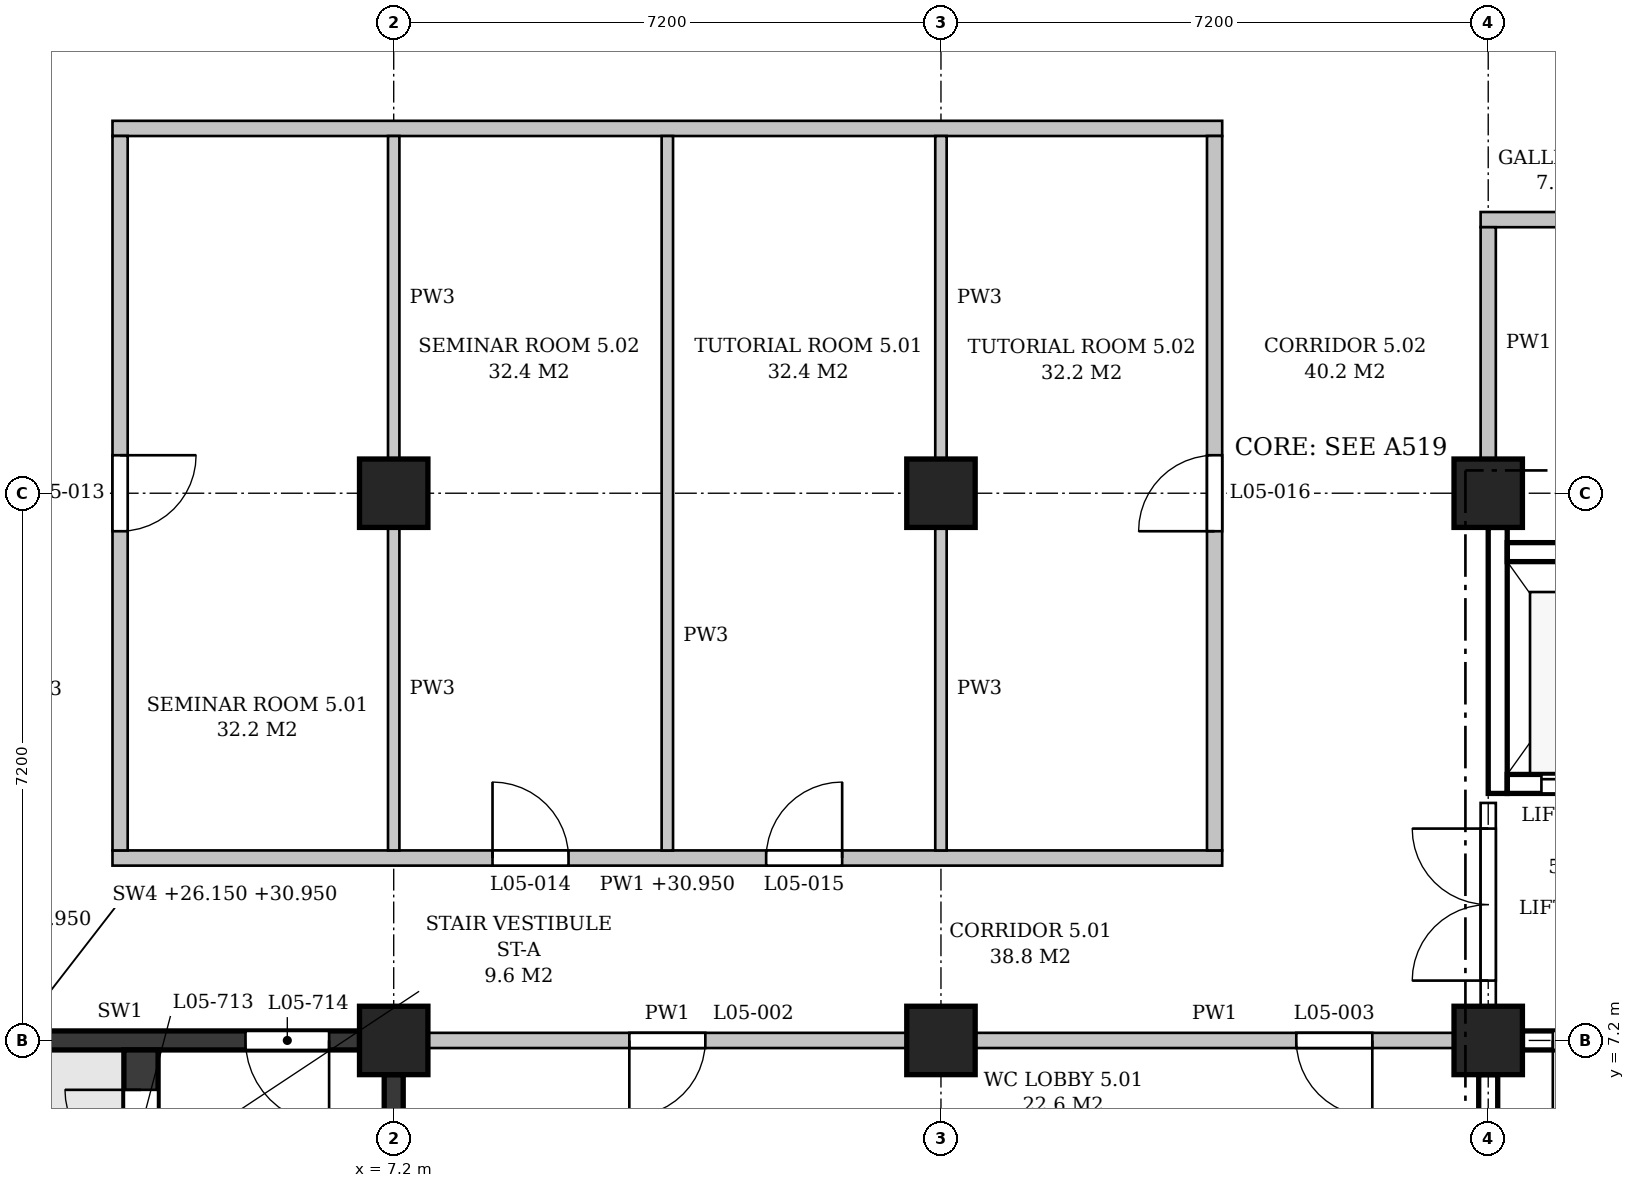
"""IFC4 building model, lengths in metres.
Left out: names, types, materials, properties, quantities, classifications, styles, units other than length and angle.
Written with IfcOpenShell. Run it as: python <this file> out.ifc"""

import sys

from ifc_helpers import new_model, si_unit, direction, frame, frame_2d, origin, origin_2d, place, context, subcontext, project, spatial, polyline, rectangle, outline, extrude, element, fill, save


model = new_model("IFC4")
c1 = context("Model", 3, precision=1e-05, world=origin(), true_north=direction((0.0, 1.0)))
c2 = subcontext(c1, "Body", "Model", "MODEL_VIEW")
j1 = project(units=[si_unit("LENGTHUNIT", "METRE"), si_unit("PLANEANGLEUNIT", "RADIAN")], contexts=[c1])
p1 = place(None, origin())
s1 = spatial("IfcSite", under=j1, at=p1, CompositionType="ELEMENT")
p2 = place(p1, origin())
s2 = spatial("IfcBuilding", under=s1, at=p2, CompositionType="ELEMENT")
p3 = place(p2, frame((0.0, 0.0, 26.4)))
s3 = spatial("IfcBuildingStorey", under=s2, at=p3, CompositionType="ELEMENT", Elevation=26.4)
for number, where, z_axis, x_axis in (
    (1, (7.2, 7.2, 0.0), (0.0, 0.0, 1.0), (1.0, 0.0, 0.0)),
    (2, (7.2, 14.4, 0.0), (0.0, 0.0, 1.0), (1.0, 0.0, 0.0)),
    (3, (14.4, 7.2, 0.0), (0.0, 0.0, 1.0), (1.0, 0.0, 0.0)),
    (4, (14.4, 14.4, 0.0), (0.0, 0.0, 1.0), (1.0, 0.0, 0.0)),
    (5, (21.6, 7.2, 0.0), (0.0, 0.0, 1.0), (1.0, 0.0, 0.0)),
    (6, (21.6, 14.4, 0.0), (0.0, 0.0, 1.0), (1.0, 0.0, 0.0)),
):
    element("IfcColumn", number, at=place(p3, frame(where, z_axis=z_axis, x_axis=x_axis)), inside=s3, PredefinedType="COLUMN", context=c2, shape_type="SweptSolid", body=[
        extrude(rectangle(XDim=0.9, YDim=0.9, at=origin_2d()), origin(), (0.0, 0.0, 1.0), 4.8),
    ])
p4 = place(p3, frame((0.45, 7.2, 0.0), z_axis=(0.0, 0.0, 1.0), x_axis=(1.0, 0.0, 0.0)))
e7 = element("IfcWall", 7, at=p4, inside=s3, PredefinedType="SHEAR", context=c2, shape_type="SweptSolid", body=[
    extrude(rectangle(XDim=6.3, YDim=0.25, at=frame_2d((3.15, 0.0))), origin(), (0.0, 0.0, 1.0), 3.8),
])
p5 = place(p4, frame((4.8, 0.0, 0.0)))
e8 = element("IfcOpeningElement", 8, at=p5, cuts=e7, PredefinedType="OPENING", context=c2, shape_type="SweptSolid", body=[
    extrude(rectangle(XDim=1.1, YDim=2.1, at=frame_2d((0.55, 1.05))), frame((0.0, 0.135, 0.0), z_axis=(0.0, -1.0, 0.0), x_axis=(1.0, 0.0, 0.0)), (0.0, 0.0, 1.0), 0.27),
])
p6 = place(p3, frame((7.2, 0.45, 0.0), z_axis=(0.0, 0.0, 1.0), x_axis=(0.0, 1.0, 0.0)))
e9 = element("IfcWall", 9, at=p6, inside=s3, PredefinedType="SHEAR", context=c2, shape_type="SweptSolid", body=[
    extrude(rectangle(XDim=6.3, YDim=0.25, at=frame_2d((3.15, 0.0))), origin(), (0.0, 0.0, 1.0), 3.8),
])
p7 = place(p3, frame((3.875, 0.225, 0.0), z_axis=(0.0, 0.0, 1.0), x_axis=(0.0, 1.0, 0.0)))
e10 = element("IfcWall", 10, at=p7, inside=s3, PredefinedType="SHEAR", context=c2, shape_type="SweptSolid", body=[
    extrude(rectangle(XDim=6.85, YDim=0.45, at=frame_2d((3.425, 0.0))), origin(), (0.0, 0.0, 1.0), 4.55),
])
p8 = place(p7, frame((5.325, 0.0, 0.0)))
e11 = element("IfcOpeningElement", 11, at=p8, cuts=e10, PredefinedType="OPENING", context=c2, shape_type="SweptSolid", body=[
    extrude(rectangle(XDim=1.0, YDim=2.1, at=frame_2d((0.5, 1.05))), frame((0.0, 0.235, 0.0), z_axis=(0.0, -1.0, 0.0), x_axis=(1.0, 0.0, 0.0)), (0.0, 0.0, 1.0), 0.47),
])
p9 = place(p3, frame((22.05, 7.2, 0.0), z_axis=(0.0, 0.0, 1.0), x_axis=(1.0, 0.0, 0.0)))
e12 = element("IfcWall", 12, at=p9, inside=s3, PredefinedType="SHEAR", context=c2, shape_type="SweptSolid", body=[
    extrude(rectangle(XDim=6.3, YDim=0.25, at=frame_2d((3.15, 0.0))), origin(), (0.0, 0.0, 1.0), 3.8),
])
p10 = place(p9, frame((0.4, 0.0, 0.0)))
e13 = element("IfcOpeningElement", 13, at=p10, cuts=e12, PredefinedType="OPENING", context=c2, shape_type="SweptSolid", body=[
    extrude(rectangle(XDim=1.1, YDim=2.1, at=frame_2d((0.55, 1.05))), frame((0.0, 0.135, 0.0), z_axis=(0.0, -1.0, 0.0), x_axis=(1.0, 0.0, 0.0)), (0.0, 0.0, 1.0), 0.27),
])
p11 = place(p3, frame((21.6, 0.45, 0.0), z_axis=(0.0, 0.0, 1.0), x_axis=(0.0, 1.0, 0.0)))
e14 = element("IfcWall", 14, at=p11, inside=s3, PredefinedType="SHEAR", context=c2, shape_type="SweptSolid", body=[
    extrude(rectangle(XDim=6.3, YDim=0.25, at=frame_2d((3.15, 0.0))), origin(), (0.0, 0.0, 1.0), 3.8),
])
p12 = place(p3, frame((21.725, 10.45, -0.25), z_axis=(0.0, 0.0, 1.0), x_axis=(0.0, 1.0, 0.0)))
e15 = element("IfcWall", 15, at=p12, inside=s3, PredefinedType="SHEAR", context=c2, shape_type="SweptSolid", body=[
    extrude(rectangle(XDim=3.5, YDim=0.25, at=frame_2d((1.75, 0.0))), origin(), (0.0, 0.0, 1.0), 4.05),
])
p13 = place(p3, frame((21.85, 10.575, -0.25), z_axis=(0.0, 0.0, 1.0), x_axis=(1.0, 0.0, 0.0)))
e16 = element("IfcWall", 16, at=p13, inside=s3, PredefinedType="SHEAR", context=c2, shape_type="SweptSolid", body=[
    extrude(rectangle(XDim=2.0, YDim=0.25, at=frame_2d((1.0, 0.0))), origin(), (0.0, 0.0, 1.0), 4.8),
])
p14 = place(p13, frame((0.45, 0.0, 0.25)))
e17 = element("IfcOpeningElement", 17, at=p14, cuts=e16, PredefinedType="OPENING", context=c2, shape_type="SweptSolid", body=[
    extrude(rectangle(XDim=1.1, YDim=2.1, at=frame_2d((0.55, 1.05))), frame((0.0, 0.135, 0.0), z_axis=(0.0, -1.0, 0.0), x_axis=(1.0, 0.0, 0.0)), (0.0, 0.0, 1.0), 0.27),
])
p15 = place(p3, frame((21.85, 13.625, -0.25), z_axis=(0.0, 0.0, 1.0), x_axis=(1.0, 0.0, 0.0)))
e18 = element("IfcWall", 18, at=p15, inside=s3, PredefinedType="SHEAR", context=c2, shape_type="SweptSolid", body=[
    extrude(rectangle(XDim=2.0, YDim=0.25, at=frame_2d((1.0, 0.0))), origin(), (0.0, 0.0, 1.0), 4.8),
])
p16 = place(p3, frame((7.65, 7.2, 0.0), z_axis=(0.0, 0.0, 1.0), x_axis=(1.0, 0.0, 0.0)))
e19 = element("IfcWall", 19, at=p16, inside=s3, PredefinedType="PARTITIONING", context=c2, shape_type="SweptSolid", body=[
    extrude(rectangle(XDim=6.3, YDim=0.2, at=frame_2d((3.15, 0.0))), origin(), (0.0, 0.0, 1.0), 3.8),
])
p17 = place(p16, frame((2.65, 0.0, 0.0)))
e20 = element("IfcOpeningElement", 20, at=p17, cuts=e19, PredefinedType="OPENING", context=c2, shape_type="SweptSolid", body=[
    extrude(rectangle(XDim=1.0, YDim=2.1, at=frame_2d((0.5, 1.05))), frame((0.0, 0.11, 0.0), z_axis=(0.0, -1.0, 0.0), x_axis=(1.0, 0.0, 0.0)), (0.0, 0.0, 1.0), 0.22),
])
p18 = place(p3, frame((14.85, 7.2, 0.0), z_axis=(0.0, 0.0, 1.0), x_axis=(1.0, 0.0, 0.0)))
e21 = element("IfcWall", 21, at=p18, inside=s3, PredefinedType="PARTITIONING", context=c2, shape_type="SweptSolid", body=[
    extrude(rectangle(XDim=6.3, YDim=0.2, at=frame_2d((3.15, 0.0))), origin(), (0.0, 0.0, 1.0), 3.8),
])
p19 = place(p18, frame((4.225, 0.0, 0.0)))
e22 = element("IfcOpeningElement", 22, at=p19, cuts=e21, PredefinedType="OPENING", context=c2, shape_type="SweptSolid", body=[
    extrude(rectangle(XDim=1.0, YDim=2.1, at=frame_2d((0.5, 1.05))), frame((0.0, 0.11, 0.0), z_axis=(0.0, -1.0, 0.0), x_axis=(1.0, 0.0, 0.0)), (0.0, 0.0, 1.0), 0.22),
])
p20 = place(p3, frame((3.5, 9.6, 0.0), z_axis=(0.0, 0.0, 1.0), x_axis=(1.0, 0.0, 0.0)))
e23 = element("IfcWall", 23, at=p20, inside=s3, PredefinedType="PARTITIONING", context=c2, shape_type="SweptSolid", body=[
    extrude(outline(polyline([(0.0, 0.0), (14.6, 0.0), (14.6, 4.55), (11.15, 4.55), (11.15, 3.8), (10.65, 3.8), (10.65, 4.55), (3.95, 4.55), (3.95, 3.8), (3.45, 3.8), (3.45, 4.55), (0.0, 4.55), (0.0, 0.0)])), frame((0.0, 0.1, 0.0), z_axis=(0.0, -1.0, 0.0), x_axis=(1.0, 0.0, 0.0)), (0.0, 0.0, 1.0), 0.2),
])
p21 = place(p20, frame((5.0, 0.0, 0.0)))
e24 = element("IfcOpeningElement", 24, at=p21, cuts=e23, PredefinedType="OPENING", context=c2, shape_type="SweptSolid", body=[
    extrude(rectangle(XDim=1.0, YDim=2.1, at=frame_2d((0.5, 1.05))), frame((0.0, 0.11, 0.0), z_axis=(0.0, -1.0, 0.0), x_axis=(1.0, 0.0, 0.0)), (0.0, 0.0, 1.0), 0.22),
])
p22 = place(p20, frame((8.6, 0.0, 0.0)))
e25 = element("IfcOpeningElement", 25, at=p22, cuts=e23, PredefinedType="OPENING", context=c2, shape_type="SweptSolid", body=[
    extrude(rectangle(XDim=1.0, YDim=2.1, at=frame_2d((0.5, 1.05))), frame((0.0, 0.11, 0.0), z_axis=(0.0, -1.0, 0.0), x_axis=(1.0, 0.0, 0.0)), (0.0, 0.0, 1.0), 0.22),
])
p23 = place(p3, frame((21.5, 18.0, 0.0), z_axis=(0.0, 0.0, 1.0), x_axis=(1.0, 0.0, 0.0)))
e26 = element("IfcWall", 26, at=p23, inside=s3, PredefinedType="PARTITIONING", context=c2, shape_type="SweptSolid", body=[
    extrude(outline(polyline([(0.0, 0.0), (7.15, 0.0), (7.15, 3.95), (7.05, 3.95), (7.05, 4.55), (0.35, 4.55), (0.35, 3.8), (0.0, 3.8), (0.0, 0.0)])), frame((0.0, 0.1, 0.0), z_axis=(0.0, -1.0, 0.0), x_axis=(1.0, 0.0, 0.0)), (0.0, 0.0, 1.0), 0.2),
])
p24 = place(p23, frame((3.125, 0.0, 0.0)))
e27 = element("IfcOpeningElement", 27, at=p24, cuts=e26, PredefinedType="OPENING", context=c2, shape_type="SweptSolid", body=[
    extrude(rectangle(XDim=1.0, YDim=2.1, at=frame_2d((0.5, 1.05))), frame((0.0, 0.11, 0.0), z_axis=(0.0, -1.0, 0.0), x_axis=(1.0, 0.0, 0.0)), (0.0, 0.0, 1.0), 0.22),
])
p25 = place(p3, frame((3.5, 19.2, 0.0), z_axis=(0.0, 0.0, 1.0), x_axis=(1.0, 0.0, 0.0)))
e28 = element("IfcWall", 28, at=p25, inside=s3, PredefinedType="PARTITIONING", context=c2, shape_type="SweptSolid", body=[
    extrude(outline(polyline([(0.0, 0.0), (14.6, 0.0), (14.6, 4.55), (11.15, 4.55), (11.15, 3.8), (10.65, 3.8), (10.65, 4.55), (3.95, 4.55), (3.95, 3.8), (3.45, 3.8), (3.45, 4.55), (0.0, 4.55), (0.0, 0.0)])), frame((0.0, 0.1, 0.0), z_axis=(0.0, -1.0, 0.0), x_axis=(1.0, 0.0, 0.0)), (0.0, 0.0, 1.0), 0.2),
])
p26 = place(p3, frame((3.6, 9.7, 0.0), z_axis=(0.0, 0.0, 1.0), x_axis=(0.0, 1.0, 0.0)))
e29 = element("IfcWall", 29, at=p26, inside=s3, PredefinedType="PARTITIONING", context=c2, shape_type="SweptSolid", body=[
    extrude(outline(polyline([(0.0, 0.0), (9.4, 0.0), (9.4, 4.55), (4.95, 4.55), (4.95, 3.8), (4.45, 3.8), (4.45, 4.55), (0.0, 4.55), (0.0, 0.0)])), frame((0.0, 0.1, 0.0), z_axis=(0.0, -1.0, 0.0), x_axis=(1.0, 0.0, 0.0)), (0.0, 0.0, 1.0), 0.2),
])
p27 = place(p26, frame((4.2, 0.0, 0.0)))
e30 = element("IfcOpeningElement", 30, at=p27, cuts=e29, PredefinedType="OPENING", context=c2, shape_type="SweptSolid", body=[
    extrude(rectangle(XDim=1.0, YDim=2.1, at=frame_2d((0.5, 1.05))), frame((0.0, 0.11, 0.0), z_axis=(0.0, -1.0, 0.0), x_axis=(1.0, 0.0, 0.0)), (0.0, 0.0, 1.0), 0.22),
])
for number, where, z_axis, x_axis in (
    (31, (7.2, 9.7, 0.0), (0.0, 0.0, 1.0), (0.0, 1.0, 0.0)),
    (32, (7.2, 14.85, 0.0), (0.0, 0.0, 1.0), (0.0, 1.0, 0.0)),
):
    element("IfcWall", number, at=place(p3, frame(where, z_axis=z_axis, x_axis=x_axis)), inside=s3, PredefinedType="PARTITIONING", context=c2, shape_type="SweptSolid", body=[
        extrude(rectangle(XDim=4.25, YDim=0.15, at=frame_2d((2.125, 0.0))), origin(), (0.0, 0.0, 1.0), 3.8),
    ])
p28 = place(p3, frame((10.8, 9.7, 0.0), z_axis=(0.0, 0.0, 1.0), x_axis=(0.0, 1.0, 0.0)))
e33 = element("IfcWall", 33, at=p28, inside=s3, PredefinedType="PARTITIONING", context=c2, shape_type="SweptSolid", body=[
    extrude(rectangle(XDim=9.4, YDim=0.15, at=frame_2d((4.7, 0.0))), origin(), (0.0, 0.0, 1.0), 3.8),
])
for number, where, z_axis, x_axis in (
    (34, (14.4, 9.7, 0.0), (0.0, 0.0, 1.0), (0.0, 1.0, 0.0)),
    (35, (14.4, 14.85, 0.0), (0.0, 0.0, 1.0), (0.0, 1.0, 0.0)),
):
    element("IfcWall", number, at=place(p3, frame(where, z_axis=z_axis, x_axis=x_axis)), inside=s3, PredefinedType="PARTITIONING", context=c2, shape_type="SweptSolid", body=[
        extrude(rectangle(XDim=4.25, YDim=0.15, at=frame_2d((2.125, 0.0))), origin(), (0.0, 0.0, 1.0), 3.8),
    ])
p29 = place(p3, frame((18.0, 9.7, 0.0), z_axis=(0.0, 0.0, 1.0), x_axis=(0.0, 1.0, 0.0)))
e36 = element("IfcWall", 36, at=p29, inside=s3, PredefinedType="PARTITIONING", context=c2, shape_type="SweptSolid", body=[
    extrude(outline(polyline([(0.0, 0.0), (9.4, 0.0), (9.4, 4.55), (4.95, 4.55), (4.95, 3.8), (4.45, 3.8), (4.45, 4.55), (0.0, 4.55), (0.0, 0.0)])), frame((0.0, 0.1, 0.0), z_axis=(0.0, -1.0, 0.0), x_axis=(1.0, 0.0, 0.0)), (0.0, 0.0, 1.0), 0.2),
])
p30 = place(p29, frame((4.2, 0.0, 0.0)))
e37 = element("IfcOpeningElement", 37, at=p30, cuts=e36, PredefinedType="OPENING", context=c2, shape_type="SweptSolid", body=[
    extrude(rectangle(XDim=1.0, YDim=2.1, at=frame_2d((0.5, 1.05))), frame((0.0, 0.11, 0.0), z_axis=(0.0, -1.0, 0.0), x_axis=(1.0, 0.0, 0.0)), (0.0, 0.0, 1.0), 0.22),
])
p31 = place(p3, frame((21.6, 7.65, 0.0), z_axis=(0.0, 0.0, 1.0), x_axis=(0.0, 1.0, 0.0)))
e38 = element("IfcWall", 38, at=p31, inside=s3, PredefinedType="PARTITIONING", context=c2, shape_type="SweptSolid", body=[
    extrude(rectangle(XDim=2.675, YDim=0.2, at=frame_2d((1.337, 0.0))), origin(), (0.0, 0.0, 1.0), 3.8),
])
p32 = place(p31, frame((0.337, 0.0, 0.0)))
e39 = element("IfcOpeningElement", 39, at=p32, cuts=e38, PredefinedType="OPENING", context=c2, shape_type="SweptSolid", body=[
    extrude(rectangle(XDim=2.0, YDim=2.4, at=frame_2d((1.0, 1.2))), frame((0.0, 0.11, 0.0), z_axis=(0.0, -1.0, 0.0), x_axis=(1.0, 0.0, 0.0)), (0.0, 0.0, 1.0), 0.22),
])
p33 = place(p3, frame((21.6, 14.85, 0.0), z_axis=(0.0, 0.0, 1.0), x_axis=(0.0, 1.0, 0.0)))
e40 = element("IfcWall", 40, at=p33, inside=s3, PredefinedType="PARTITIONING", context=c2, shape_type="SweptSolid", body=[
    extrude(rectangle(XDim=3.05, YDim=0.2, at=frame_2d((1.525, 0.0))), origin(), (0.0, 0.0, 1.0), 3.8),
])
p34 = place(p8, origin())
e41 = element("IfcDoor", 41, at=p34, inside=s3, OperationType="SINGLE_SWING_RIGHT", PredefinedType="DOOR", context=c2, shape_type="SweptSolid", body=[
    extrude(rectangle(XDim=1.0, YDim=2.1, at=frame_2d((0.5, 1.05))), frame((0.0, 0.025, 0.0), z_axis=(0.0, -1.0, 0.0), x_axis=(1.0, 0.0, 0.0)), (0.0, 0.0, 1.0), 0.05),
])
fill(e11, e41)
p35 = place(p5, frame((1.1, 0.0, 0.0), z_axis=(0.0, 0.0, 1.0), x_axis=(-1.0, 0.0, 0.0)))
e42 = element("IfcDoor", 42, at=p35, inside=s3, OperationType="SINGLE_SWING_LEFT", PredefinedType="DOOR", context=c2, shape_type="SweptSolid", body=[
    extrude(rectangle(XDim=1.1, YDim=2.1, at=frame_2d((0.55, 1.05))), frame((0.0, 0.025, 0.0), z_axis=(0.0, -1.0, 0.0), x_axis=(1.0, 0.0, 0.0)), (0.0, 0.0, 1.0), 0.05),
])
fill(e8, e42)
p36 = place(p10, frame((1.1, 0.0, 0.0), z_axis=(0.0, 0.0, 1.0), x_axis=(-1.0, 0.0, 0.0)))
e43 = element("IfcDoor", 43, at=p36, inside=s3, OperationType="SINGLE_SWING_RIGHT", PredefinedType="DOOR", context=c2, shape_type="SweptSolid", body=[
    extrude(rectangle(XDim=1.1, YDim=2.1, at=frame_2d((0.55, 1.05))), frame((0.0, 0.025, 0.0), z_axis=(0.0, -1.0, 0.0), x_axis=(1.0, 0.0, 0.0)), (0.0, 0.0, 1.0), 0.05),
])
fill(e13, e43)
p37 = place(p14, origin())
e44 = element("IfcDoor", 44, at=p37, inside=s3, OperationType="SLIDING_TO_LEFT", PredefinedType="DOOR", context=c2, shape_type="SweptSolid", body=[
    extrude(rectangle(XDim=1.1, YDim=2.1, at=frame_2d((0.55, 1.05))), frame((0.0, 0.025, 0.0), z_axis=(0.0, -1.0, 0.0), x_axis=(1.0, 0.0, 0.0)), (0.0, 0.0, 1.0), 0.05),
])
fill(e17, e44)
p38 = place(p32, origin())
e45 = element("IfcDoor", 45, at=p38, inside=s3, OperationType="DOUBLE_DOOR_SINGLE_SWING", PredefinedType="DOOR", context=c2, shape_type="SweptSolid", body=[
    extrude(rectangle(XDim=2.0, YDim=2.4, at=frame_2d((1.0, 1.2))), frame((0.0, 0.025, 0.0), z_axis=(0.0, -1.0, 0.0), x_axis=(1.0, 0.0, 0.0)), (0.0, 0.0, 1.0), 0.05),
])
fill(e39, e45)
p39 = place(p17, frame((1.0, 0.0, 0.0), z_axis=(0.0, 0.0, 1.0), x_axis=(-1.0, 0.0, 0.0)))
e46 = element("IfcDoor", 46, at=p39, inside=s3, OperationType="SINGLE_SWING_RIGHT", PredefinedType="DOOR", context=c2, shape_type="SweptSolid", body=[
    extrude(rectangle(XDim=1.0, YDim=2.1, at=frame_2d((0.5, 1.05))), frame((0.0, 0.025, 0.0), z_axis=(0.0, -1.0, 0.0), x_axis=(1.0, 0.0, 0.0)), (0.0, 0.0, 1.0), 0.05),
])
fill(e20, e46)
p40 = place(p19, frame((1.0, 0.0, 0.0), z_axis=(0.0, 0.0, 1.0), x_axis=(-1.0, 0.0, 0.0)))
e47 = element("IfcDoor", 47, at=p40, inside=s3, OperationType="SINGLE_SWING_LEFT", PredefinedType="DOOR", context=c2, shape_type="SweptSolid", body=[
    extrude(rectangle(XDim=1.0, YDim=2.1, at=frame_2d((0.5, 1.05))), frame((0.0, 0.025, 0.0), z_axis=(0.0, -1.0, 0.0), x_axis=(1.0, 0.0, 0.0)), (0.0, 0.0, 1.0), 0.05),
])
fill(e22, e47)
p41 = place(p27, frame((1.0, 0.0, 0.0), z_axis=(0.0, 0.0, 1.0), x_axis=(-1.0, 0.0, 0.0)))
e48 = element("IfcDoor", 48, at=p41, inside=s3, OperationType="SINGLE_SWING_LEFT", PredefinedType="DOOR", context=c2, shape_type="SweptSolid", body=[
    extrude(rectangle(XDim=1.0, YDim=2.1, at=frame_2d((0.5, 1.05))), frame((0.0, 0.025, 0.0), z_axis=(0.0, -1.0, 0.0), x_axis=(1.0, 0.0, 0.0)), (0.0, 0.0, 1.0), 0.05),
])
fill(e30, e48)
p42 = place(p21, origin())
e49 = element("IfcDoor", 49, at=p42, inside=s3, OperationType="SINGLE_SWING_LEFT", PredefinedType="DOOR", context=c2, shape_type="SweptSolid", body=[
    extrude(rectangle(XDim=1.0, YDim=2.1, at=frame_2d((0.5, 1.05))), frame((0.0, 0.025, 0.0), z_axis=(0.0, -1.0, 0.0), x_axis=(1.0, 0.0, 0.0)), (0.0, 0.0, 1.0), 0.05),
])
fill(e24, e49)
p43 = place(p22, origin())
e50 = element("IfcDoor", 50, at=p43, inside=s3, OperationType="SINGLE_SWING_RIGHT", PredefinedType="DOOR", context=c2, shape_type="SweptSolid", body=[
    extrude(rectangle(XDim=1.0, YDim=2.1, at=frame_2d((0.5, 1.05))), frame((0.0, 0.025, 0.0), z_axis=(0.0, -1.0, 0.0), x_axis=(1.0, 0.0, 0.0)), (0.0, 0.0, 1.0), 0.05),
])
fill(e25, e50)
p44 = place(p30, origin())
e51 = element("IfcDoor", 51, at=p44, inside=s3, OperationType="SINGLE_SWING_LEFT", PredefinedType="DOOR", context=c2, shape_type="SweptSolid", body=[
    extrude(rectangle(XDim=1.0, YDim=2.1, at=frame_2d((0.5, 1.05))), frame((0.0, 0.025, 0.0), z_axis=(0.0, -1.0, 0.0), x_axis=(1.0, 0.0, 0.0)), (0.0, 0.0, 1.0), 0.05),
])
fill(e37, e51)
save(model, sys.argv[1])
